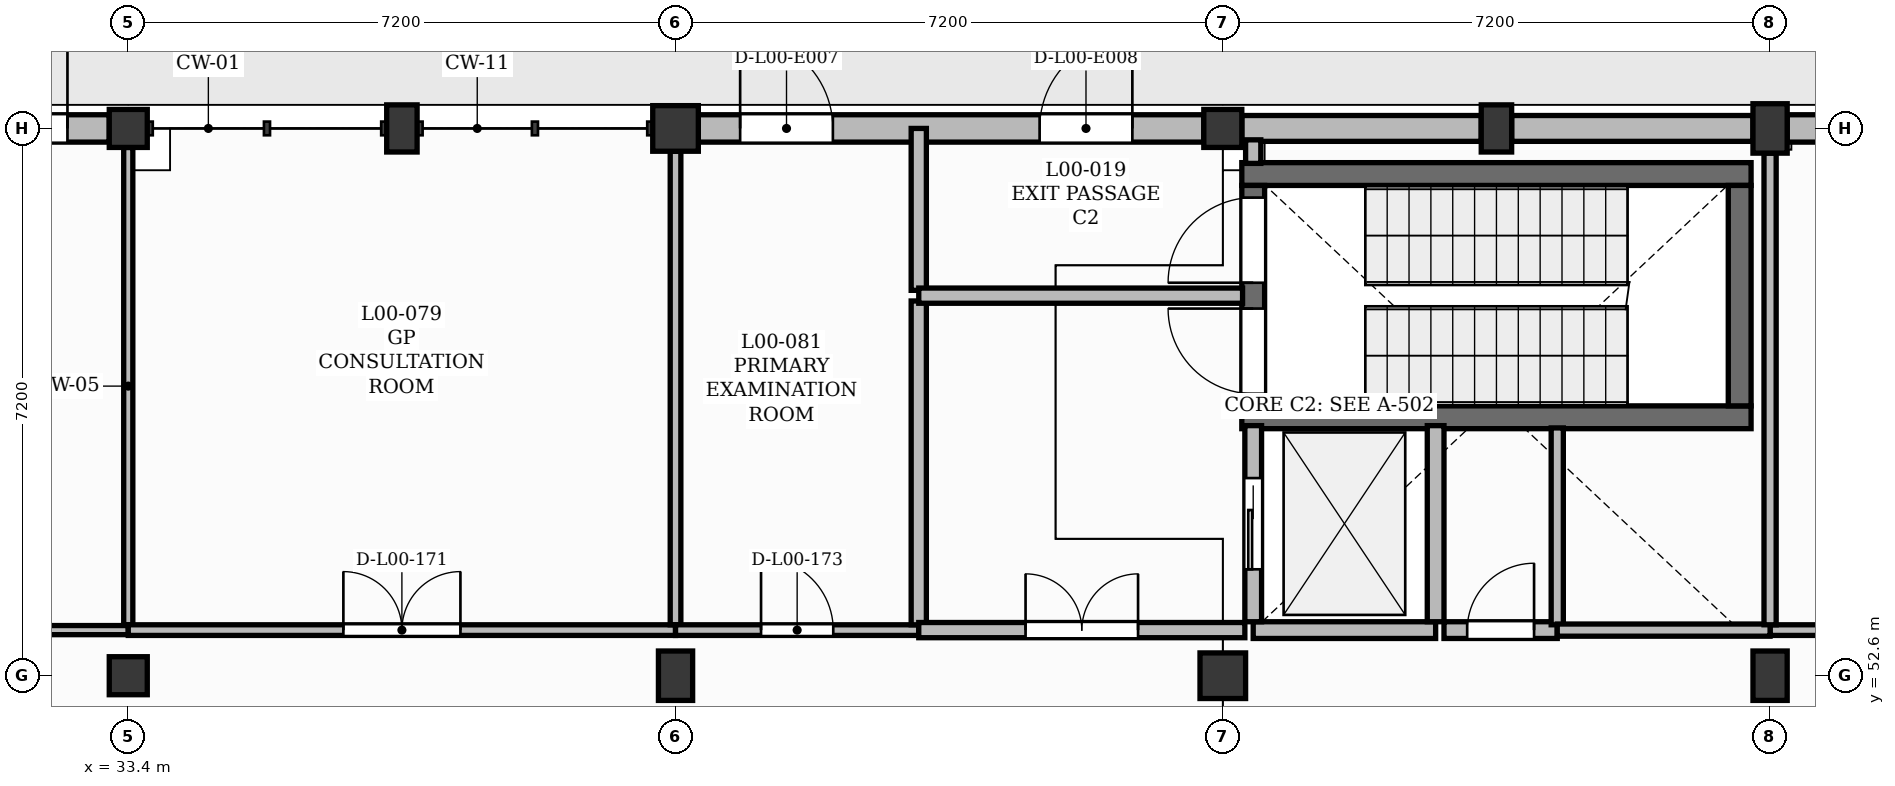
"""IFC4 building model, lengths in metres.
Left out: names, types, materials, properties, quantities, classifications, styles, units other than length and angle.
Written with IfcOpenShell. Run it as: python <this file> out.ifc"""

import sys

from ifc_helpers import new_model, si_unit, direction, frame, frame_2d, origin, origin_2d, place, context, subcontext, project, spatial, rectangle, extrude, element, fill, save


model = new_model("IFC4")
c1 = context("Model", 3, precision=1e-05, world=origin(), true_north=direction((0.0, 1.0)))
c2 = subcontext(c1, "Body", "Model", "MODEL_VIEW")
j1 = project(units=[si_unit("LENGTHUNIT", "METRE"), si_unit("PLANEANGLEUNIT", "RADIAN")], contexts=[c1])
p1 = place(None, origin())
s1 = spatial("IfcSite", under=j1, at=p1, CompositionType="ELEMENT")
p2 = place(p1, origin())
s2 = spatial("IfcBuilding", under=s1, at=p2, CompositionType="ELEMENT")
p3 = place(p2, origin())
s3 = spatial("IfcBuildingStorey", under=s2, at=p3, CompositionType="ELEMENT", Elevation=0.0)
for number, where, z_axis, x_axis in (
    (1, (33.4, 52.6, 0.0), (0.0, 0.0, 1.0), (1.0, 0.0, 0.0)),
    (2, (33.4, 59.8, 0.0), (0.0, 0.0, 1.0), (1.0, 0.0, 0.0)),
):
    element("IfcColumn", number, at=place(p3, frame(where, z_axis=z_axis, x_axis=x_axis)), inside=s3, PredefinedType="COLUMN", context=c2, shape_type="SweptSolid", body=[
        extrude(rectangle(XDim=0.5, YDim=0.5, at=origin_2d()), origin(), (0.0, 0.0, 1.0), 4.2),
    ])
p4 = place(p3, frame((40.6, 52.6, 0.0), z_axis=(0.0, 0.0, 1.0), x_axis=(1.0, 0.0, 0.0)))
e3 = element("IfcColumn", 3, at=p4, inside=s3, PredefinedType="COLUMN", context=c2, shape_type="SweptSolid", body=[
    extrude(rectangle(XDim=0.45, YDim=0.65, at=origin_2d()), origin(), (0.0, 0.0, 1.0), 4.2),
])
for number, where, z_axis, x_axis in (
    (4, (40.6, 59.8, 0.0), (0.0, 0.0, 1.0), (1.0, 0.0, 0.0)),
    (5, (47.8, 52.6, 0.0), (0.0, 0.0, 1.0), (1.0, 0.0, 0.0)),
):
    element("IfcColumn", number, at=place(p3, frame(where, z_axis=z_axis, x_axis=x_axis)), inside=s3, PredefinedType="COLUMN", context=c2, shape_type="SweptSolid", body=[
        extrude(rectangle(XDim=0.6, YDim=0.6, at=origin_2d()), origin(), (0.0, 0.0, 1.0), 4.2),
    ])
p5 = place(p3, frame((47.8, 59.8, 0.0), z_axis=(0.0, 0.0, 1.0), x_axis=(1.0, 0.0, 0.0)))
e6 = element("IfcColumn", 6, at=p5, inside=s3, PredefinedType="COLUMN", context=c2, shape_type="SweptSolid", body=[
    extrude(rectangle(XDim=0.5, YDim=0.5, at=origin_2d()), origin(), (0.0, 0.0, 1.0), 4.2),
])
for number, where, z_axis, x_axis in (
    (7, (55.0, 52.6, 0.0), (0.0, 0.0, 1.0), (1.0, 0.0, 0.0)),
    (8, (55.0, 59.8, 0.0), (0.0, 0.0, 1.0), (1.0, 0.0, 0.0)),
):
    element("IfcColumn", number, at=place(p3, frame(where, z_axis=z_axis, x_axis=x_axis)), inside=s3, PredefinedType="COLUMN", context=c2, shape_type="SweptSolid", body=[
        extrude(rectangle(XDim=0.45, YDim=0.65, at=origin_2d()), origin(), (0.0, 0.0, 1.0), 4.2),
    ])
for number, where, z_axis, x_axis in (
    (9, (37.0, 59.8, 0.0), (0.0, 0.0, 1.0), (1.0, 0.0, 0.0)),
    (10, (51.4, 59.8, 0.0), (0.0, 0.0, 1.0), (1.0, 0.0, 0.0)),
):
    element("IfcColumn", number, at=place(p3, frame(where, z_axis=z_axis, x_axis=x_axis)), inside=s3, PredefinedType="PILASTER", context=c2, shape_type="SweptSolid", body=[
        extrude(rectangle(XDim=0.4, YDim=0.62, at=origin_2d()), origin(), (0.0, 0.0, 1.0), 4.2),
    ])
p6 = place(p3, frame((26.425, 59.8, 0.0), z_axis=(0.0, 0.0, 1.0), x_axis=(1.0, 0.0, 0.0)))
e11 = element("IfcWall", 11, at=p6, inside=s3, PredefinedType="SOLIDWALL", context=c2, shape_type="SweptSolid", body=[
    extrude(rectangle(XDim=6.725, YDim=0.36, at=frame_2d((3.362, 0.0))), origin(), (0.0, 0.0, 1.0), 3.68),
])
p7 = place(p6, frame((3.775, 0.0, 0.0)))
e12 = element("IfcOpeningElement", 12, at=p7, cuts=e11, PredefinedType="OPENING", context=c2, shape_type="SweptSolid", body=[
    extrude(rectangle(XDim=2.4, YDim=2.8, at=frame_2d((1.2, 1.4))), frame((0.0, 0.19, 0.0), z_axis=(0.0, -1.0, 0.0), x_axis=(1.0, 0.0, 0.0)), (0.0, 0.0, 1.0), 0.38),
])
p8 = place(p6, frame((0.698, 0.0, 1.0)))
e13 = element("IfcOpeningElement", 13, at=p8, cuts=e11, PredefinedType="OPENING", context=c2, shape_type="SweptSolid", body=[
    extrude(rectangle(XDim=1.35, YDim=2.2, at=frame_2d((0.675, 1.1))), frame((0.0, 0.19, 0.0), z_axis=(0.0, -1.0, 0.0), x_axis=(1.0, 0.0, 0.0)), (0.0, 0.0, 1.0), 0.38),
])
p9 = place(p3, frame((40.9, 59.8, 0.0), z_axis=(0.0, 0.0, 1.0), x_axis=(1.0, 0.0, 0.0)))
e14 = element("IfcWall", 14, at=p9, inside=s3, PredefinedType="SOLIDWALL", context=c2, shape_type="SweptSolid", body=[
    extrude(rectangle(XDim=6.65, YDim=0.36, at=frame_2d((3.325, 0.0))), origin(), (0.0, 0.0, 1.0), 3.68),
])
p10 = place(p9, frame((0.55, 0.0, 0.0)))
e15 = element("IfcOpeningElement", 15, at=p10, cuts=e14, PredefinedType="OPENING", context=c2, shape_type="SweptSolid", body=[
    extrude(rectangle(XDim=1.22, YDim=2.2, at=frame_2d((0.61, 1.1))), frame((0.0, 0.19, 0.0), z_axis=(0.0, -1.0, 0.0), x_axis=(1.0, 0.0, 0.0)), (0.0, 0.0, 1.0), 0.38),
])
p11 = place(p9, frame((4.49, 0.0, 0.0)))
e16 = element("IfcOpeningElement", 16, at=p11, cuts=e14, PredefinedType="OPENING", context=c2, shape_type="SweptSolid", body=[
    extrude(rectangle(XDim=1.22, YDim=2.2, at=frame_2d((0.61, 1.1))), frame((0.0, 0.19, 0.0), z_axis=(0.0, -1.0, 0.0), x_axis=(1.0, 0.0, 0.0)), (0.0, 0.0, 1.0), 0.38),
])
p12 = place(p3, frame((48.05, 59.8, 0.0), z_axis=(0.0, 0.0, 1.0), x_axis=(1.0, 0.0, 0.0)))
e17 = element("IfcWall", 17, at=p12, inside=s3, PredefinedType="SOLIDWALL", context=c2, shape_type="SweptSolid", body=[
    extrude(rectangle(XDim=3.15, YDim=0.34, at=frame_2d((1.575, 0.0))), origin(), (0.0, 0.0, 1.0), 3.68),
])
p13 = place(p3, frame((51.6, 59.8, 0.0), z_axis=(0.0, 0.0, 1.0), x_axis=(1.0, 0.0, 0.0)))
e18 = element("IfcWall", 18, at=p13, inside=s3, PredefinedType="SOLIDWALL", context=c2, shape_type="SweptSolid", body=[
    extrude(rectangle(XDim=3.175, YDim=0.34, at=frame_2d((1.587, 0.0))), origin(), (0.0, 0.0, 1.0), 3.68),
])
p14 = place(p3, frame((55.225, 59.8, 0.0), z_axis=(0.0, 0.0, 1.0), x_axis=(1.0, 0.0, 0.0)))
e19 = element("IfcWall", 19, at=p14, inside=s3, PredefinedType="SOLIDWALL", context=c2, shape_type="SweptSolid", body=[
    extrude(rectangle(XDim=3.2, YDim=0.36, at=frame_2d((1.6, 0.0))), origin(), (0.0, 0.0, 1.0), 3.68),
])
p15 = place(p14, frame((1.025, 0.0, 1.5)))
e20 = element("IfcOpeningElement", 20, at=p15, cuts=e19, PredefinedType="OPENING", context=c2, shape_type="SweptSolid", body=[
    extrude(rectangle(XDim=1.15, YDim=1.25, at=frame_2d((0.575, 0.625))), frame((0.0, 0.19, 0.0), z_axis=(0.0, -1.0, 0.0), x_axis=(1.0, 0.0, 0.0)), (0.0, 0.0, 1.0), 0.38),
])
for number, where, z_axis, x_axis in (
    (21, (48.05, 56.0, 0.0), (0.0, 0.0, 1.0), (1.0, 0.0, 0.0)),
    (22, (48.05, 59.2, 0.0), (0.0, 0.0, 1.0), (1.0, 0.0, 0.0)),
):
    element("IfcWall", number, at=place(p3, frame(where, z_axis=z_axis, x_axis=x_axis)), inside=s3, PredefinedType="SHEAR", context=c2, shape_type="SweptSolid", body=[
        extrude(rectangle(XDim=6.7, YDim=0.3, at=frame_2d((3.35, 0.0))), origin(), (0.0, 0.0, 1.0), 4.25),
    ])
p16 = place(p3, frame((48.2, 56.15, 0.0), z_axis=(0.0, 0.0, 1.0), x_axis=(0.0, 1.0, 0.0)))
e23 = element("IfcWall", 23, at=p16, inside=s3, PredefinedType="SHEAR", context=c2, shape_type="SweptSolid", body=[
    extrude(rectangle(XDim=2.9, YDim=0.3, at=frame_2d((1.45, 0.0))), origin(), (0.0, 0.0, 1.0), 4.25),
])
p17 = place(p16, frame((1.62, 0.0, 0.0)))
e24 = element("IfcOpeningElement", 24, at=p17, cuts=e23, PredefinedType="OPENING", context=c2, shape_type="SweptSolid", body=[
    extrude(rectangle(XDim=1.12, YDim=2.1, at=frame_2d((0.56, 1.05))), frame((0.0, 0.16, 0.0), z_axis=(0.0, -1.0, 0.0), x_axis=(1.0, 0.0, 0.0)), (0.0, 0.0, 1.0), 0.32),
])
p18 = place(p16, frame((0.16, 0.0, 0.0)))
e25 = element("IfcOpeningElement", 25, at=p18, cuts=e23, PredefinedType="OPENING", context=c2, shape_type="SweptSolid", body=[
    extrude(rectangle(XDim=1.12, YDim=2.1, at=frame_2d((0.56, 1.05))), frame((0.0, 0.16, 0.0), z_axis=(0.0, -1.0, 0.0), x_axis=(1.0, 0.0, 0.0)), (0.0, 0.0, 1.0), 0.32),
])
p19 = place(p3, frame((54.6, 56.15, 0.0), z_axis=(0.0, 0.0, 1.0), x_axis=(0.0, 1.0, 0.0)))
e26 = element("IfcWall", 26, at=p19, inside=s3, PredefinedType="SHEAR", context=c2, shape_type="SweptSolid", body=[
    extrude(rectangle(XDim=2.9, YDim=0.3, at=frame_2d((1.45, 0.0))), origin(), (0.0, 0.0, 1.0), 4.25),
])
p20 = place(p3, frame((48.2, 53.2, 0.0), z_axis=(0.0, 0.0, 1.0), x_axis=(1.0, 0.0, 0.0)))
e27 = element("IfcWall", 27, at=p20, inside=s3, PredefinedType="SOLIDWALL", context=c2, shape_type="SweptSolid", body=[
    extrude(rectangle(XDim=2.4, YDim=0.22, at=frame_2d((1.2, 0.0))), origin(), (0.0, 0.0, 1.0), 4.25),
])
p21 = place(p3, frame((48.2, 53.31, 0.0), z_axis=(0.0, 0.0, 1.0), x_axis=(0.0, 1.0, 0.0)))
e28 = element("IfcWall", 28, at=p21, inside=s3, PredefinedType="SOLIDWALL", context=c2, shape_type="SweptSolid", body=[
    extrude(rectangle(XDim=2.58, YDim=0.22, at=frame_2d((1.29, 0.0))), origin(), (0.0, 0.0, 1.0), 4.25),
])
p22 = place(p21, frame((0.69, 0.0, 0.0)))
e29 = element("IfcOpeningElement", 29, at=p22, cuts=e28, PredefinedType="OPENING", context=c2, shape_type="SweptSolid", body=[
    extrude(rectangle(XDim=1.2, YDim=2.15, at=frame_2d((0.6, 1.075))), frame((0.0, 0.12, 0.0), z_axis=(0.0, -1.0, 0.0), x_axis=(1.0, 0.0, 0.0)), (0.0, 0.0, 1.0), 0.24),
])
p23 = place(p3, frame((50.6, 53.31, 0.0), z_axis=(0.0, 0.0, 1.0), x_axis=(0.0, 1.0, 0.0)))
e30 = element("IfcWall", 30, at=p23, inside=s3, PredefinedType="SOLIDWALL", context=c2, shape_type="SweptSolid", body=[
    extrude(rectangle(XDim=2.58, YDim=0.22, at=frame_2d((1.29, 0.0))), origin(), (0.0, 0.0, 1.0), 4.25),
])
p24 = place(p3, frame((29.05, 53.2, 0.0), z_axis=(0.0, 0.0, 1.0), x_axis=(1.0, 0.0, 0.0)))
e31 = element("IfcWall", 31, at=p24, inside=s3, PredefinedType="PLUMBINGWALL", context=c2, shape_type="SweptSolid", body=[
    extrude(rectangle(XDim=4.35, YDim=0.12, at=frame_2d((2.175, 0.0))), origin(), (0.0, 0.0, 1.0), 4.18),
])
p25 = place(p24, frame((1.725, 0.0, 0.0)))
e32 = element("IfcOpeningElement", 32, at=p25, cuts=e31, PredefinedType="OPENING", context=c2, shape_type="SweptSolid", body=[
    extrude(rectangle(XDim=0.9, YDim=2.1, at=frame_2d((0.45, 1.05))), frame((0.0, 0.07, 0.0), z_axis=(0.0, -1.0, 0.0), x_axis=(1.0, 0.0, 0.0)), (0.0, 0.0, 1.0), 0.14),
])
p26 = place(p3, frame((33.4, 53.27, 0.0), z_axis=(0.0, 0.0, 1.0), x_axis=(0.0, 1.0, 0.0)))
e33 = element("IfcWall", 33, at=p26, inside=s3, PredefinedType="PLUMBINGWALL", context=c2, shape_type="SweptSolid", body=[
    extrude(rectangle(XDim=6.28, YDim=0.12, at=frame_2d((3.14, 0.0))), origin(), (0.0, 0.0, 1.0), 3.5),
])
p27 = place(p3, frame((33.4, 53.2, 0.0), z_axis=(0.0, 0.0, 1.0), x_axis=(1.0, 0.0, 0.0)))
e34 = element("IfcWall", 34, at=p27, inside=s3, PredefinedType="PARTITIONING", context=c2, shape_type="SweptSolid", body=[
    extrude(rectangle(XDim=7.2, YDim=0.14, at=frame_2d((3.6, 0.0))), origin(), (0.0, 0.0, 1.0), 4.18),
])
p28 = place(p27, frame((2.83, 0.0, 0.0)))
e35 = element("IfcOpeningElement", 35, at=p28, cuts=e34, PredefinedType="OPENING", context=c2, shape_type="SweptSolid", body=[
    extrude(rectangle(XDim=1.54, YDim=2.25, at=frame_2d((0.77, 1.125))), frame((0.0, 0.08, 0.0), z_axis=(0.0, -1.0, 0.0), x_axis=(1.0, 0.0, 0.0)), (0.0, 0.0, 1.0), 0.16),
])
p29 = place(p3, frame((40.6, 53.27, 0.0), z_axis=(0.0, 0.0, 1.0), x_axis=(0.0, 1.0, 0.0)))
e36 = element("IfcWall", 36, at=p29, inside=s3, PredefinedType="PARTITIONING", context=c2, shape_type="SweptSolid", body=[
    extrude(rectangle(XDim=6.23, YDim=0.14, at=frame_2d((3.115, 0.0))), origin(), (0.0, 0.0, 1.0), 3.5),
])
p30 = place(p3, frame((40.6, 53.2, 0.0), z_axis=(0.0, 0.0, 1.0), x_axis=(1.0, 0.0, 0.0)))
e37 = element("IfcWall", 37, at=p30, inside=s3, PredefinedType="PARTITIONING", context=c2, shape_type="SweptSolid", body=[
    extrude(rectangle(XDim=3.2, YDim=0.14, at=frame_2d((1.6, 0.0))), origin(), (0.0, 0.0, 1.0), 4.18),
])
p31 = place(p30, frame((1.125, 0.0, 0.0)))
e38 = element("IfcOpeningElement", 38, at=p31, cuts=e37, PredefinedType="OPENING", context=c2, shape_type="SweptSolid", body=[
    extrude(rectangle(XDim=0.95, YDim=2.1, at=frame_2d((0.475, 1.05))), frame((0.0, 0.08, 0.0), z_axis=(0.0, -1.0, 0.0), x_axis=(1.0, 0.0, 0.0)), (0.0, 0.0, 1.0), 0.16),
])
p32 = place(p3, frame((43.8, 53.27, 0.0), z_axis=(0.0, 0.0, 1.0), x_axis=(0.0, 1.0, 0.0)))
e39 = element("IfcWall", 39, at=p32, inside=s3, PredefinedType="PARTITIONING", context=c2, shape_type="SweptSolid", body=[
    extrude(rectangle(XDim=4.26, YDim=0.2, at=frame_2d((2.13, 0.0))), origin(), (0.0, 0.0, 1.0), 4.18),
])
p33 = place(p3, frame((43.8, 53.2, 0.0), z_axis=(0.0, 0.0, 1.0), x_axis=(1.0, 0.0, 0.0)))
e40 = element("IfcWall", 40, at=p33, inside=s3, PredefinedType="PARTITIONING", context=c2, shape_type="SweptSolid", body=[
    extrude(rectangle(XDim=4.29, YDim=0.2, at=frame_2d((2.145, 0.0))), origin(), (0.0, 0.0, 1.0), 4.18),
])
p34 = place(p33, frame((1.405, 0.0, 0.0)))
e41 = element("IfcOpeningElement", 41, at=p34, cuts=e40, PredefinedType="OPENING", context=c2, shape_type="SweptSolid", body=[
    extrude(rectangle(XDim=1.48, YDim=2.25, at=frame_2d((0.74, 1.125))), frame((0.0, 0.11, 0.0), z_axis=(0.0, -1.0, 0.0), x_axis=(1.0, 0.0, 0.0)), (0.0, 0.0, 1.0), 0.22),
])
p35 = place(p3, frame((43.8, 57.67, 0.0), z_axis=(0.0, 0.0, 1.0), x_axis=(0.0, 1.0, 0.0)))
e42 = element("IfcWall", 42, at=p35, inside=s3, PredefinedType="PARTITIONING", context=c2, shape_type="SweptSolid", body=[
    extrude(rectangle(XDim=2.13, YDim=0.2, at=frame_2d((1.065, 0.0))), origin(), (0.0, 0.0, 1.0), 4.18),
])
p36 = place(p3, frame((43.8, 57.6, 0.0), z_axis=(0.0, 0.0, 1.0), x_axis=(1.0, 0.0, 0.0)))
e43 = element("IfcWall", 43, at=p36, inside=s3, PredefinedType="PARTITIONING", context=c2, shape_type="SweptSolid", body=[
    extrude(rectangle(XDim=4.26, YDim=0.2, at=frame_2d((2.13, 0.0))), origin(), (0.0, 0.0, 1.0), 4.18),
])
p37 = place(p3, frame((50.71, 53.2, 0.0), z_axis=(0.0, 0.0, 1.0), x_axis=(1.0, 0.0, 0.0)))
e44 = element("IfcWall", 44, at=p37, inside=s3, PredefinedType="SOLIDWALL", context=c2, shape_type="SweptSolid", body=[
    extrude(rectangle(XDim=1.49, YDim=0.22, at=frame_2d((0.745, 0.0))), origin(), (0.0, 0.0, 1.0), 4.18),
])
p38 = place(p37, frame((0.305, 0.0, 0.0)))
e45 = element("IfcOpeningElement", 45, at=p38, cuts=e44, PredefinedType="OPENING", context=c2, shape_type="SweptSolid", body=[
    extrude(rectangle(XDim=0.88, YDim=2.05, at=frame_2d((0.44, 1.025))), frame((0.0, 0.12, 0.0), z_axis=(0.0, -1.0, 0.0), x_axis=(1.0, 0.0, 0.0)), (0.0, 0.0, 1.0), 0.24),
])
p39 = place(p3, frame((55.0, 53.2, 0.0), z_axis=(0.0, 0.0, 1.0), x_axis=(1.0, 0.0, 0.0)))
e46 = element("IfcWall", 46, at=p39, inside=s3, PredefinedType="PARTITIONING", context=c2, shape_type="SweptSolid", body=[
    extrude(rectangle(XDim=3.722, YDim=0.14, at=frame_2d((1.861, 0.0))), origin(), (0.0, 0.0, 1.0), 4.18),
])
p40 = place(p39, frame((1.386, 0.0, 0.0)))
e47 = element("IfcOpeningElement", 47, at=p40, cuts=e46, PredefinedType="OPENING", context=c2, shape_type="SweptSolid", body=[
    extrude(rectangle(XDim=0.95, YDim=2.1, at=frame_2d((0.475, 1.05))), frame((0.0, 0.08, 0.0), z_axis=(0.0, -1.0, 0.0), x_axis=(1.0, 0.0, 0.0)), (0.0, 0.0, 1.0), 0.16),
])
p41 = place(p3, frame((52.2, 53.27, 0.0), z_axis=(0.0, 0.0, 1.0), x_axis=(0.0, 1.0, 0.0)))
e48 = element("IfcWall", 48, at=p41, inside=s3, PredefinedType="PARTITIONING", context=c2, shape_type="SweptSolid", body=[
    extrude(rectangle(XDim=2.59, YDim=0.16, at=frame_2d((1.295, 0.0))), origin(), (0.0, 0.0, 1.0), 4.18),
])
p42 = place(p3, frame((48.2, 59.34, 0.0), z_axis=(0.0, 0.0, 1.0), x_axis=(0.0, 1.0, 0.0)))
e49 = element("IfcWall", 49, at=p42, inside=s3, PredefinedType="PARTITIONING", context=c2, shape_type="SweptSolid", body=[
    extrude(rectangle(XDim=0.31, YDim=0.2, at=frame_2d((0.155, 0.0))), origin(), (0.0, 0.0, 1.0), 4.18),
])
p43 = place(p3, frame((55.0, 53.2, 0.0), z_axis=(0.0, 0.0, 1.0), x_axis=(-1.0, 0.0, 0.0)))
e50 = element("IfcWall", 50, at=p43, inside=s3, PredefinedType="PARTITIONING", context=c2, shape_type="SweptSolid", body=[
    extrude(rectangle(XDim=2.8, YDim=0.16, at=frame_2d((1.4, 0.0))), origin(), (0.0, 0.0, 1.0), 4.18),
])
p44 = place(p3, frame((55.0, 53.27, 0.0), z_axis=(0.0, 0.0, 1.0), x_axis=(0.0, 1.0, 0.0)))
e51 = element("IfcWall", 51, at=p44, inside=s3, PredefinedType="PARTITIONING", context=c2, shape_type="SweptSolid", body=[
    extrude(rectangle(XDim=6.205, YDim=0.16, at=frame_2d((3.103, 0.0))), origin(), (0.0, 0.0, 1.0), 3.5),
])
p45 = place(p7, origin())
e52 = element("IfcDoor", 52, at=p45, inside=s3, OperationType="DOUBLE_DOOR_SINGLE_SWING", PredefinedType="DOOR", context=c2, shape_type="SweptSolid", body=[
    extrude(rectangle(XDim=2.4, YDim=2.8, at=frame_2d((1.2, 1.4))), frame((0.0, 0.025, 0.0), z_axis=(0.0, -1.0, 0.0), x_axis=(1.0, 0.0, 0.0)), (0.0, 0.0, 1.0), 0.05),
])
fill(e12, e52)
p46 = place(p10, origin())
e53 = element("IfcDoor", 53, at=p46, inside=s3, OperationType="SINGLE_SWING_LEFT", PredefinedType="DOOR", context=c2, shape_type="SweptSolid", body=[
    extrude(rectangle(XDim=1.22, YDim=2.2, at=frame_2d((0.61, 1.1))), frame((0.0, 0.025, 0.0), z_axis=(0.0, -1.0, 0.0), x_axis=(1.0, 0.0, 0.0)), (0.0, 0.0, 1.0), 0.05),
])
fill(e15, e53)
p47 = place(p11, origin())
e54 = element("IfcDoor", 54, at=p47, inside=s3, OperationType="SINGLE_SWING_RIGHT", PredefinedType="DOOR", context=c2, shape_type="SweptSolid", body=[
    extrude(rectangle(XDim=1.22, YDim=2.2, at=frame_2d((0.61, 1.1))), frame((0.0, 0.025, 0.0), z_axis=(0.0, -1.0, 0.0), x_axis=(1.0, 0.0, 0.0)), (0.0, 0.0, 1.0), 0.05),
])
fill(e16, e54)
p48 = place(p22, origin())
e55 = element("IfcDoor", 55, at=p48, inside=s3, OperationType="SLIDING_TO_LEFT", PredefinedType="DOOR", context=c2, shape_type="SweptSolid", body=[
    extrude(rectangle(XDim=1.2, YDim=2.15, at=frame_2d((0.6, 1.075))), frame((0.0, 0.025, 0.0), z_axis=(0.0, -1.0, 0.0), x_axis=(1.0, 0.0, 0.0)), (0.0, 0.0, 1.0), 0.05),
])
fill(e29, e55)
p49 = place(p17, origin())
e56 = element("IfcDoor", 56, at=p49, inside=s3, OperationType="SINGLE_SWING_LEFT", PredefinedType="DOOR", context=c2, shape_type="SweptSolid", body=[
    extrude(rectangle(XDim=1.12, YDim=2.1, at=frame_2d((0.56, 1.05))), frame((0.0, 0.025, 0.0), z_axis=(0.0, -1.0, 0.0), x_axis=(1.0, 0.0, 0.0)), (0.0, 0.0, 1.0), 0.05),
])
fill(e24, e56)
p50 = place(p18, origin())
e57 = element("IfcDoor", 57, at=p50, inside=s3, OperationType="SINGLE_SWING_RIGHT", PredefinedType="DOOR", context=c2, shape_type="SweptSolid", body=[
    extrude(rectangle(XDim=1.12, YDim=2.1, at=frame_2d((0.56, 1.05))), frame((0.0, 0.025, 0.0), z_axis=(0.0, -1.0, 0.0), x_axis=(1.0, 0.0, 0.0)), (0.0, 0.0, 1.0), 0.05),
])
fill(e25, e57)
p51 = place(p34, origin())
e58 = element("IfcDoor", 58, at=p51, inside=s3, OperationType="DOUBLE_DOOR_SINGLE_SWING", PredefinedType="DOOR", context=c2, shape_type="SweptSolid", body=[
    extrude(rectangle(XDim=1.48, YDim=2.25, at=frame_2d((0.74, 1.125))), frame((0.0, 0.025, 0.0), z_axis=(0.0, -1.0, 0.0), x_axis=(1.0, 0.0, 0.0)), (0.0, 0.0, 1.0), 0.05),
])
fill(e41, e58)
p52 = place(p38, origin())
e59 = element("IfcDoor", 59, at=p52, inside=s3, OperationType="SINGLE_SWING_RIGHT", PredefinedType="DOOR", context=c2, shape_type="SweptSolid", body=[
    extrude(rectangle(XDim=0.88, YDim=2.05, at=frame_2d((0.44, 1.025))), frame((0.0, 0.025, 0.0), z_axis=(0.0, -1.0, 0.0), x_axis=(1.0, 0.0, 0.0)), (0.0, 0.0, 1.0), 0.05),
])
fill(e45, e59)
p53 = place(p28, origin())
e60 = element("IfcDoor", 60, at=p53, inside=s3, OperationType="DOUBLE_DOOR_SINGLE_SWING", PredefinedType="DOOR", context=c2, shape_type="SweptSolid", body=[
    extrude(rectangle(XDim=1.54, YDim=2.25, at=frame_2d((0.77, 1.125))), frame((0.0, 0.025, 0.0), z_axis=(0.0, -1.0, 0.0), x_axis=(1.0, 0.0, 0.0)), (0.0, 0.0, 1.0), 0.05),
])
fill(e35, e60)
p54 = place(p31, origin())
e61 = element("IfcDoor", 61, at=p54, inside=s3, OperationType="SINGLE_SWING_LEFT", PredefinedType="DOOR", context=c2, shape_type="SweptSolid", body=[
    extrude(rectangle(XDim=0.95, YDim=2.1, at=frame_2d((0.475, 1.05))), frame((0.0, 0.025, 0.0), z_axis=(0.0, -1.0, 0.0), x_axis=(1.0, 0.0, 0.0)), (0.0, 0.0, 1.0), 0.05),
])
fill(e38, e61)
save(model, sys.argv[1])
